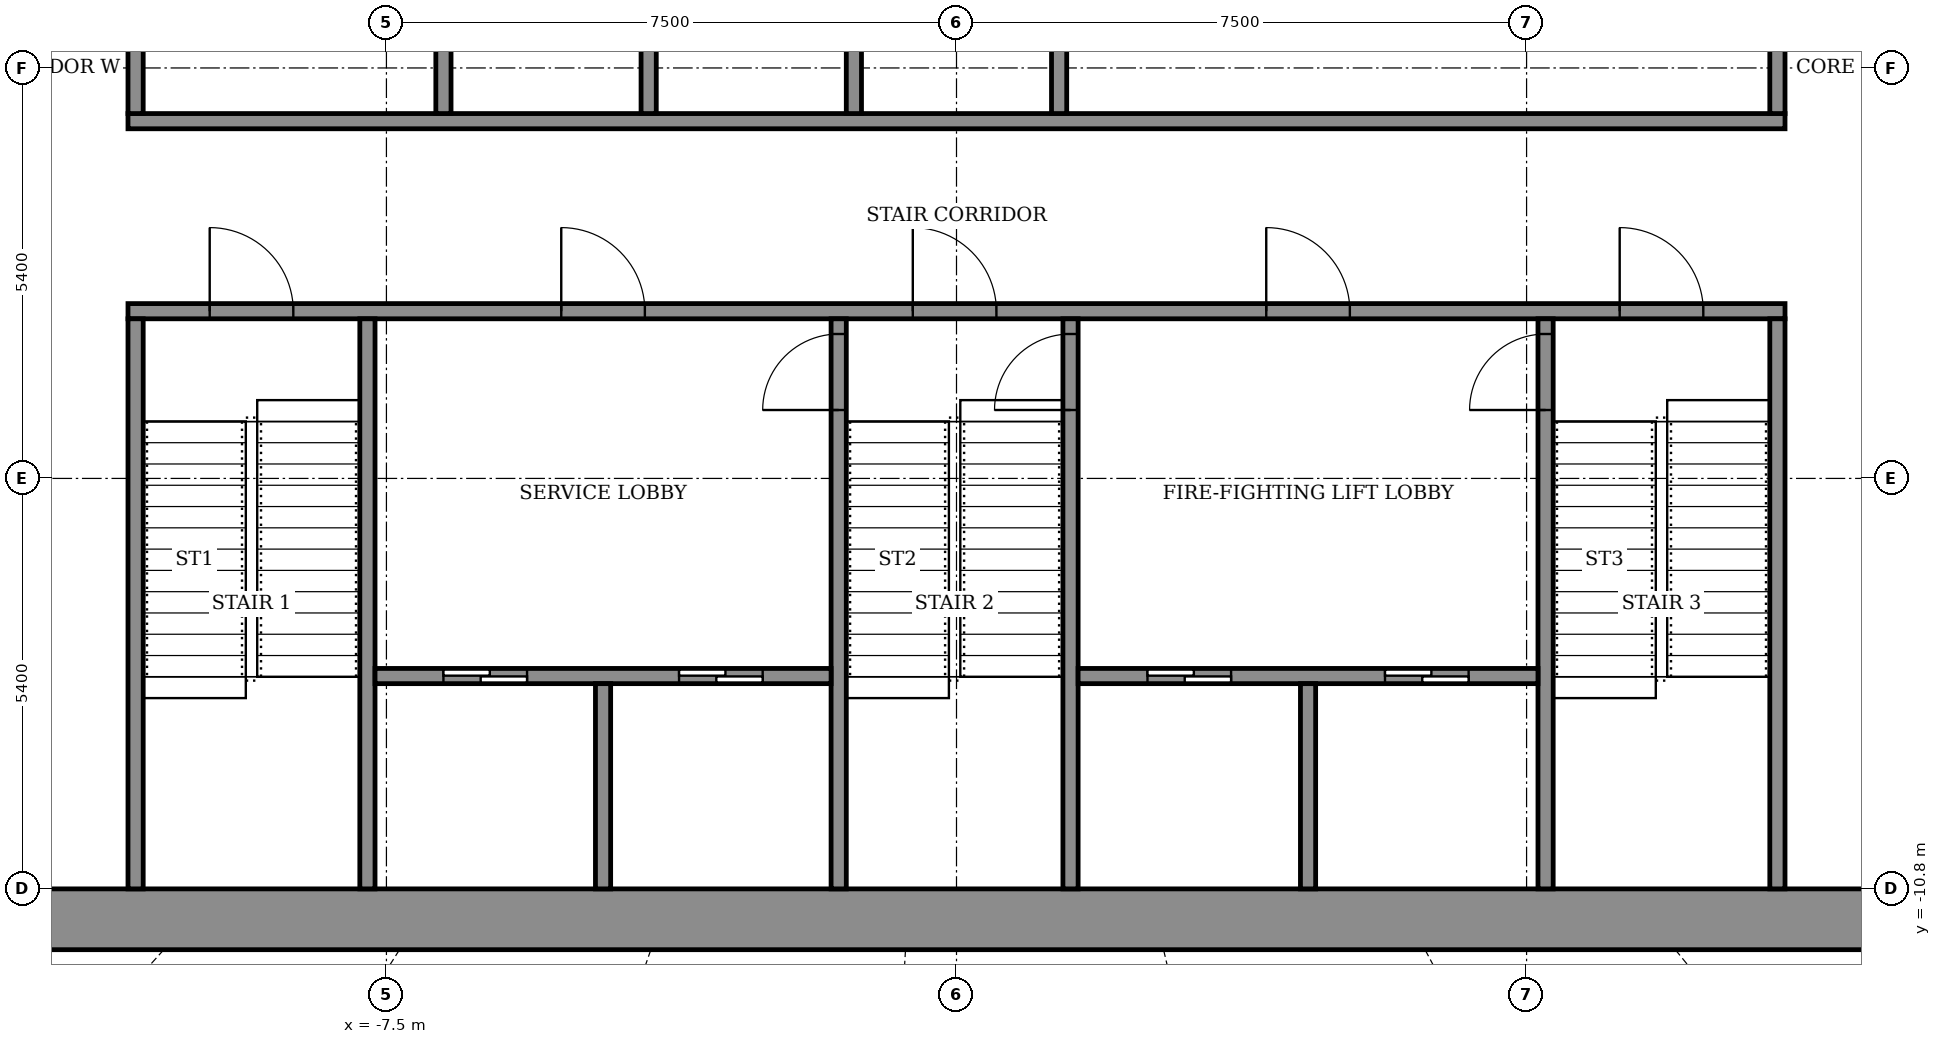
"""IFC4 building model, lengths in metres.
Left out: names, types, materials, properties, quantities, classifications, styles, units other than length and angle.
Written with IfcOpenShell. Run it as: python <this file> out.ifc"""

import sys

from ifc_helpers import new_model, si_unit, direction, frame, frame_2d, origin, place, context, subcontext, project, spatial, rectangle, extrude, element, fill, save


model = new_model("IFC4")
c1 = context("Model", 3, precision=1e-05, world=origin(), true_north=direction((0.0, 1.0)))
c2 = subcontext(c1, "Body", "Model", "MODEL_VIEW")
j1 = project(units=[si_unit("LENGTHUNIT", "METRE"), si_unit("PLANEANGLEUNIT", "RADIAN")], contexts=[c1])
p1 = place(None, origin())
s1 = spatial("IfcSite", under=j1, at=p1, CompositionType="ELEMENT")
p2 = place(p1, origin())
s2 = spatial("IfcBuilding", under=s1, at=p2, CompositionType="ELEMENT")
p3 = place(p2, frame((0.0, 0.0, 226.5)))
s3 = spatial("IfcBuildingStorey", under=s2, at=p3, CompositionType="ELEMENT", Elevation=226.5)
p4 = place(p3, frame((-14.6, -11.2, 0.0), z_axis=(0.0, 0.0, 1.0), x_axis=(1.0, 0.0, 0.0)))
e1 = element("IfcWall", 1, at=p4, inside=s3, PredefinedType="SHEAR", context=c2, shape_type="SweptSolid", body=[
    extrude(rectangle(XDim=29.2, YDim=0.8, at=frame_2d((14.6, 0.0))), origin(), (0.0, 0.0, 1.0), 4.6),
])
p5 = place(p3, frame((-10.9, -3.2, 0.0), z_axis=(0.0, 0.0, 1.0), x_axis=(1.0, 0.0, 0.0)))
e2 = element("IfcWall", 2, at=p5, inside=s3, PredefinedType="SHEAR", context=c2, shape_type="SweptSolid", body=[
    extrude(rectangle(XDim=21.8, YDim=0.2, at=frame_2d((10.9, 0.0))), origin(), (0.0, 0.0, 1.0), 4.05),
])
p6 = place(p5, frame((1.075, 0.0, 0.0)))
e3 = element("IfcOpeningElement", 3, at=p6, cuts=e2, PredefinedType="OPENING", context=c2, shape_type="SweptSolid", body=[
    extrude(rectangle(XDim=1.1, YDim=2.1, at=frame_2d((0.55, 1.05))), frame((0.0, 0.11, 0.0), z_axis=(0.0, -1.0, 0.0), x_axis=(1.0, 0.0, 0.0)), (0.0, 0.0, 1.0), 0.22),
])
p7 = place(p5, frame((10.325, 0.0, 0.0)))
e4 = element("IfcOpeningElement", 4, at=p7, cuts=e2, PredefinedType="OPENING", context=c2, shape_type="SweptSolid", body=[
    extrude(rectangle(XDim=1.1, YDim=2.1, at=frame_2d((0.55, 1.05))), frame((0.0, 0.11, 0.0), z_axis=(0.0, -1.0, 0.0), x_axis=(1.0, 0.0, 0.0)), (0.0, 0.0, 1.0), 0.22),
])
p8 = place(p5, frame((19.625, 0.0, 0.0)))
e5 = element("IfcOpeningElement", 5, at=p8, cuts=e2, PredefinedType="OPENING", context=c2, shape_type="SweptSolid", body=[
    extrude(rectangle(XDim=1.1, YDim=2.1, at=frame_2d((0.55, 1.05))), frame((0.0, 0.11, 0.0), z_axis=(0.0, -1.0, 0.0), x_axis=(1.0, 0.0, 0.0)), (0.0, 0.0, 1.0), 0.22),
])
p9 = place(p5, frame((5.7, 0.0, 0.0)))
e6 = element("IfcOpeningElement", 6, at=p9, cuts=e2, PredefinedType="OPENING", context=c2, shape_type="SweptSolid", body=[
    extrude(rectangle(XDim=1.1, YDim=2.1, at=frame_2d((0.55, 1.05))), frame((0.0, 0.11, 0.0), z_axis=(0.0, -1.0, 0.0), x_axis=(1.0, 0.0, 0.0)), (0.0, 0.0, 1.0), 0.22),
])
p10 = place(p5, frame((14.975, 0.0, 0.0)))
e7 = element("IfcOpeningElement", 7, at=p10, cuts=e2, PredefinedType="OPENING", context=c2, shape_type="SweptSolid", body=[
    extrude(rectangle(XDim=1.1, YDim=2.1, at=frame_2d((0.55, 1.05))), frame((0.0, 0.11, 0.0), z_axis=(0.0, -1.0, 0.0), x_axis=(1.0, 0.0, 0.0)), (0.0, 0.0, 1.0), 0.22),
])
p11 = place(p3, frame((-10.9, -0.7, 0.0), z_axis=(0.0, 0.0, 1.0), x_axis=(1.0, 0.0, 0.0)))
e8 = element("IfcWall", 8, at=p11, inside=s3, PredefinedType="SHEAR", context=c2, shape_type="SweptSolid", body=[
    extrude(rectangle(XDim=21.8, YDim=0.2, at=frame_2d((10.9, 0.0))), origin(), (0.0, 0.0, 1.0), 4.05),
])
for number, where, z_axis, x_axis in (
    (9, (-10.8, -10.8, 0.0), (0.0, 0.0, 1.0), (0.0, 1.0, 0.0)),
    (10, (-7.75, -10.8, 0.0), (0.0, 0.0, 1.0), (0.0, 1.0, 0.0)),
):
    element("IfcWall", number, at=place(p3, frame(where, z_axis=z_axis, x_axis=x_axis)), inside=s3, PredefinedType="SHEAR", context=c2, shape_type="SweptSolid", body=[
        extrude(rectangle(XDim=7.5, YDim=0.2, at=frame_2d((3.75, 0.0))), origin(), (0.0, 0.0, 1.0), 4.05),
    ])
p12 = place(p3, frame((-1.55, -10.8, 0.0), z_axis=(0.0, 0.0, 1.0), x_axis=(0.0, 1.0, 0.0)))
e11 = element("IfcWall", 11, at=p12, inside=s3, PredefinedType="SHEAR", context=c2, shape_type="SweptSolid", body=[
    extrude(rectangle(XDim=7.5, YDim=0.2, at=frame_2d((3.75, 0.0))), origin(), (0.0, 0.0, 1.0), 4.05),
])
p13 = place(p12, frame((6.3, 0.0, 0.0)))
e12 = element("IfcOpeningElement", 12, at=p13, cuts=e11, PredefinedType="OPENING", context=c2, shape_type="SweptSolid", body=[
    extrude(rectangle(XDim=1.0, YDim=2.1, at=frame_2d((0.5, 1.05))), frame((0.0, 0.11, 0.0), z_axis=(0.0, -1.0, 0.0), x_axis=(1.0, 0.0, 0.0)), (0.0, 0.0, 1.0), 0.22),
])
p14 = place(p3, frame((1.5, -10.8, 0.0), z_axis=(0.0, 0.0, 1.0), x_axis=(0.0, 1.0, 0.0)))
e13 = element("IfcWall", 13, at=p14, inside=s3, PredefinedType="SHEAR", context=c2, shape_type="SweptSolid", body=[
    extrude(rectangle(XDim=7.5, YDim=0.2, at=frame_2d((3.75, 0.0))), origin(), (0.0, 0.0, 1.0), 4.05),
])
p15 = place(p14, frame((6.3, 0.0, 0.0)))
e14 = element("IfcOpeningElement", 14, at=p15, cuts=e13, PredefinedType="OPENING", context=c2, shape_type="SweptSolid", body=[
    extrude(rectangle(XDim=1.0, YDim=2.1, at=frame_2d((0.5, 1.05))), frame((0.0, 0.11, 0.0), z_axis=(0.0, -1.0, 0.0), x_axis=(1.0, 0.0, 0.0)), (0.0, 0.0, 1.0), 0.22),
])
p16 = place(p3, frame((7.75, -10.8, 0.0), z_axis=(0.0, 0.0, 1.0), x_axis=(0.0, 1.0, 0.0)))
e15 = element("IfcWall", 15, at=p16, inside=s3, PredefinedType="SHEAR", context=c2, shape_type="SweptSolid", body=[
    extrude(rectangle(XDim=7.5, YDim=0.2, at=frame_2d((3.75, 0.0))), origin(), (0.0, 0.0, 1.0), 4.05),
])
p17 = place(p16, frame((6.3, 0.0, 0.0)))
e16 = element("IfcOpeningElement", 16, at=p17, cuts=e15, PredefinedType="OPENING", context=c2, shape_type="SweptSolid", body=[
    extrude(rectangle(XDim=1.0, YDim=2.1, at=frame_2d((0.5, 1.05))), frame((0.0, 0.11, 0.0), z_axis=(0.0, -1.0, 0.0), x_axis=(1.0, 0.0, 0.0)), (0.0, 0.0, 1.0), 0.22),
])
p18 = place(p3, frame((10.8, -10.8, 0.0), z_axis=(0.0, 0.0, 1.0), x_axis=(0.0, 1.0, 0.0)))
e17 = element("IfcWall", 17, at=p18, inside=s3, PredefinedType="SHEAR", context=c2, shape_type="SweptSolid", body=[
    extrude(rectangle(XDim=7.5, YDim=0.2, at=frame_2d((3.75, 0.0))), origin(), (0.0, 0.0, 1.0), 4.05),
])
p19 = place(p3, frame((-7.65, -8.0, 0.0), z_axis=(0.0, 0.0, 1.0), x_axis=(1.0, 0.0, 0.0)))
e18 = element("IfcWall", 18, at=p19, inside=s3, PredefinedType="SHEAR", context=c2, shape_type="SweptSolid", body=[
    extrude(rectangle(XDim=6.0, YDim=0.2, at=frame_2d((3.0, 0.0))), origin(), (0.0, 0.0, 1.0), 4.05),
])
p20 = place(p19, frame((0.9, 0.0, 0.0)))
e19 = element("IfcOpeningElement", 19, at=p20, cuts=e18, PredefinedType="OPENING", context=c2, shape_type="SweptSolid", body=[
    extrude(rectangle(XDim=1.1, YDim=2.1, at=frame_2d((0.55, 1.05))), frame((0.0, 0.11, 0.0), z_axis=(0.0, -1.0, 0.0), x_axis=(1.0, 0.0, 0.0)), (0.0, 0.0, 1.0), 0.22),
])
p21 = place(p19, frame((4.0, 0.0, 0.0)))
e20 = element("IfcOpeningElement", 20, at=p21, cuts=e18, PredefinedType="OPENING", context=c2, shape_type="SweptSolid", body=[
    extrude(rectangle(XDim=1.1, YDim=2.1, at=frame_2d((0.55, 1.05))), frame((0.0, 0.11, 0.0), z_axis=(0.0, -1.0, 0.0), x_axis=(1.0, 0.0, 0.0)), (0.0, 0.0, 1.0), 0.22),
])
p22 = place(p3, frame((-4.65, -10.8, 0.0), z_axis=(0.0, 0.0, 1.0), x_axis=(0.0, 1.0, 0.0)))
e21 = element("IfcWall", 21, at=p22, inside=s3, PredefinedType="SHEAR", context=c2, shape_type="SweptSolid", body=[
    extrude(rectangle(XDim=2.7, YDim=0.2, at=frame_2d((1.35, 0.0))), origin(), (0.0, 0.0, 1.0), 4.05),
])
p23 = place(p3, frame((1.6, -8.0, 0.0), z_axis=(0.0, 0.0, 1.0), x_axis=(1.0, 0.0, 0.0)))
e22 = element("IfcWall", 22, at=p23, inside=s3, PredefinedType="SHEAR", context=c2, shape_type="SweptSolid", body=[
    extrude(rectangle(XDim=6.05, YDim=0.2, at=frame_2d((3.025, 0.0))), origin(), (0.0, 0.0, 1.0), 4.05),
])
p24 = place(p23, frame((0.913, 0.0, 0.0)))
e23 = element("IfcOpeningElement", 23, at=p24, cuts=e22, PredefinedType="OPENING", context=c2, shape_type="SweptSolid", body=[
    extrude(rectangle(XDim=1.1, YDim=2.1, at=frame_2d((0.55, 1.05))), frame((0.0, 0.11, 0.0), z_axis=(0.0, -1.0, 0.0), x_axis=(1.0, 0.0, 0.0)), (0.0, 0.0, 1.0), 0.22),
])
p25 = place(p23, frame((4.038, 0.0, 0.0)))
e24 = element("IfcOpeningElement", 24, at=p25, cuts=e22, PredefinedType="OPENING", context=c2, shape_type="SweptSolid", body=[
    extrude(rectangle(XDim=1.1, YDim=2.1, at=frame_2d((0.55, 1.05))), frame((0.0, 0.11, 0.0), z_axis=(0.0, -1.0, 0.0), x_axis=(1.0, 0.0, 0.0)), (0.0, 0.0, 1.0), 0.22),
])
p26 = place(p3, frame((4.625, -10.8, 0.0), z_axis=(0.0, 0.0, 1.0), x_axis=(0.0, 1.0, 0.0)))
e25 = element("IfcWall", 25, at=p26, inside=s3, PredefinedType="SHEAR", context=c2, shape_type="SweptSolid", body=[
    extrude(rectangle(XDim=2.7, YDim=0.2, at=frame_2d((1.35, 0.0))), origin(), (0.0, 0.0, 1.0), 4.05),
])
p27 = place(p3, frame((-10.8, -0.6, 0.0), z_axis=(0.0, 0.0, 1.0), x_axis=(0.0, 1.0, 0.0)))
e26 = element("IfcWall", 26, at=p27, inside=s3, PredefinedType="STANDARD", context=c2, shape_type="SweptSolid", body=[
    extrude(rectangle(XDim=2.5, YDim=0.2, at=frame_2d((1.25, 0.0))), origin(), (0.0, 0.0, 1.0), 4.05),
])
for number, where, z_axis, x_axis in (
    (27, (-6.75, -0.6, 0.0), (0.0, 0.0, 1.0), (0.0, 1.0, 0.0)),
    (28, (-4.05, -0.6, 0.0), (0.0, 0.0, 1.0), (0.0, 1.0, 0.0)),
    (29, (-1.35, -0.6, 0.0), (0.0, 0.0, 1.0), (0.0, 1.0, 0.0)),
    (30, (1.35, -0.6, 0.0), (0.0, 0.0, 1.0), (0.0, 1.0, 0.0)),
):
    element("IfcWall", number, at=place(p3, frame(where, z_axis=z_axis, x_axis=x_axis)), inside=s3, PredefinedType="SHEAR", context=c2, shape_type="SweptSolid", body=[
        extrude(rectangle(XDim=2.5, YDim=0.2, at=frame_2d((1.25, 0.0))), origin(), (0.0, 0.0, 1.0), 4.05),
    ])
p28 = place(p3, frame((10.8, -0.6, 0.0), z_axis=(0.0, 0.0, 1.0), x_axis=(0.0, 1.0, 0.0)))
e31 = element("IfcWall", 31, at=p28, inside=s3, PredefinedType="STANDARD", context=c2, shape_type="SweptSolid", body=[
    extrude(rectangle(XDim=2.5, YDim=0.2, at=frame_2d((1.25, 0.0))), origin(), (0.0, 0.0, 1.0), 4.05),
])
p29 = place(p24, origin())
e32 = element("IfcDoor", 32, at=p29, inside=s3, OperationType="SLIDING_TO_LEFT", PredefinedType="DOOR", context=c2, shape_type="SweptSolid", body=[
    extrude(rectangle(XDim=1.1, YDim=2.1, at=frame_2d((0.55, 1.05))), frame((0.0, 0.025, 0.0), z_axis=(0.0, -1.0, 0.0), x_axis=(1.0, 0.0, 0.0)), (0.0, 0.0, 1.0), 0.05),
])
fill(e23, e32)
p30 = place(p20, origin())
e33 = element("IfcDoor", 33, at=p30, inside=s3, OperationType="SLIDING_TO_LEFT", PredefinedType="DOOR", context=c2, shape_type="SweptSolid", body=[
    extrude(rectangle(XDim=1.1, YDim=2.1, at=frame_2d((0.55, 1.05))), frame((0.0, 0.025, 0.0), z_axis=(0.0, -1.0, 0.0), x_axis=(1.0, 0.0, 0.0)), (0.0, 0.0, 1.0), 0.05),
])
fill(e19, e33)
p31 = place(p25, origin())
e34 = element("IfcDoor", 34, at=p31, inside=s3, OperationType="SLIDING_TO_LEFT", PredefinedType="DOOR", context=c2, shape_type="SweptSolid", body=[
    extrude(rectangle(XDim=1.1, YDim=2.1, at=frame_2d((0.55, 1.05))), frame((0.0, 0.025, 0.0), z_axis=(0.0, -1.0, 0.0), x_axis=(1.0, 0.0, 0.0)), (0.0, 0.0, 1.0), 0.05),
])
fill(e24, e34)
p32 = place(p21, origin())
e35 = element("IfcDoor", 35, at=p32, inside=s3, OperationType="SLIDING_TO_LEFT", PredefinedType="DOOR", context=c2, shape_type="SweptSolid", body=[
    extrude(rectangle(XDim=1.1, YDim=2.1, at=frame_2d((0.55, 1.05))), frame((0.0, 0.025, 0.0), z_axis=(0.0, -1.0, 0.0), x_axis=(1.0, 0.0, 0.0)), (0.0, 0.0, 1.0), 0.05),
])
fill(e20, e35)
p33 = place(p6, origin())
e36 = element("IfcDoor", 36, at=p33, inside=s3, OperationType="SINGLE_SWING_RIGHT", PredefinedType="DOOR", context=c2, shape_type="SweptSolid", body=[
    extrude(rectangle(XDim=1.1, YDim=2.1, at=frame_2d((0.55, 1.05))), frame((0.0, 0.025, 0.0), z_axis=(0.0, -1.0, 0.0), x_axis=(1.0, 0.0, 0.0)), (0.0, 0.0, 1.0), 0.05),
])
fill(e3, e36)
p34 = place(p7, origin())
e37 = element("IfcDoor", 37, at=p34, inside=s3, OperationType="SINGLE_SWING_RIGHT", PredefinedType="DOOR", context=c2, shape_type="SweptSolid", body=[
    extrude(rectangle(XDim=1.1, YDim=2.1, at=frame_2d((0.55, 1.05))), frame((0.0, 0.025, 0.0), z_axis=(0.0, -1.0, 0.0), x_axis=(1.0, 0.0, 0.0)), (0.0, 0.0, 1.0), 0.05),
])
fill(e4, e37)
p35 = place(p8, origin())
e38 = element("IfcDoor", 38, at=p35, inside=s3, OperationType="SINGLE_SWING_RIGHT", PredefinedType="DOOR", context=c2, shape_type="SweptSolid", body=[
    extrude(rectangle(XDim=1.1, YDim=2.1, at=frame_2d((0.55, 1.05))), frame((0.0, 0.025, 0.0), z_axis=(0.0, -1.0, 0.0), x_axis=(1.0, 0.0, 0.0)), (0.0, 0.0, 1.0), 0.05),
])
fill(e5, e38)
p36 = place(p9, origin())
e39 = element("IfcDoor", 39, at=p36, inside=s3, OperationType="SINGLE_SWING_LEFT", PredefinedType="DOOR", context=c2, shape_type="SweptSolid", body=[
    extrude(rectangle(XDim=1.1, YDim=2.1, at=frame_2d((0.55, 1.05))), frame((0.0, 0.025, 0.0), z_axis=(0.0, -1.0, 0.0), x_axis=(1.0, 0.0, 0.0)), (0.0, 0.0, 1.0), 0.05),
])
fill(e6, e39)
p37 = place(p10, origin())
e40 = element("IfcDoor", 40, at=p37, inside=s3, OperationType="SINGLE_SWING_LEFT", PredefinedType="DOOR", context=c2, shape_type="SweptSolid", body=[
    extrude(rectangle(XDim=1.1, YDim=2.1, at=frame_2d((0.55, 1.05))), frame((0.0, 0.025, 0.0), z_axis=(0.0, -1.0, 0.0), x_axis=(1.0, 0.0, 0.0)), (0.0, 0.0, 1.0), 0.05),
])
fill(e7, e40)
p38 = place(p13, origin())
e41 = element("IfcDoor", 41, at=p38, inside=s3, OperationType="SINGLE_SWING_RIGHT", PredefinedType="DOOR", context=c2, shape_type="SweptSolid", body=[
    extrude(rectangle(XDim=1.0, YDim=2.1, at=frame_2d((0.5, 1.05))), frame((0.0, 0.025, 0.0), z_axis=(0.0, -1.0, 0.0), x_axis=(1.0, 0.0, 0.0)), (0.0, 0.0, 1.0), 0.05),
])
fill(e12, e41)
p39 = place(p15, origin())
e42 = element("IfcDoor", 42, at=p39, inside=s3, OperationType="SINGLE_SWING_RIGHT", PredefinedType="DOOR", context=c2, shape_type="SweptSolid", body=[
    extrude(rectangle(XDim=1.0, YDim=2.1, at=frame_2d((0.5, 1.05))), frame((0.0, 0.025, 0.0), z_axis=(0.0, -1.0, 0.0), x_axis=(1.0, 0.0, 0.0)), (0.0, 0.0, 1.0), 0.05),
])
fill(e14, e42)
p40 = place(p17, origin())
e43 = element("IfcDoor", 43, at=p40, inside=s3, OperationType="SINGLE_SWING_RIGHT", PredefinedType="DOOR", context=c2, shape_type="SweptSolid", body=[
    extrude(rectangle(XDim=1.0, YDim=2.1, at=frame_2d((0.5, 1.05))), frame((0.0, 0.025, 0.0), z_axis=(0.0, -1.0, 0.0), x_axis=(1.0, 0.0, 0.0)), (0.0, 0.0, 1.0), 0.05),
])
fill(e16, e43)
save(model, sys.argv[1])
